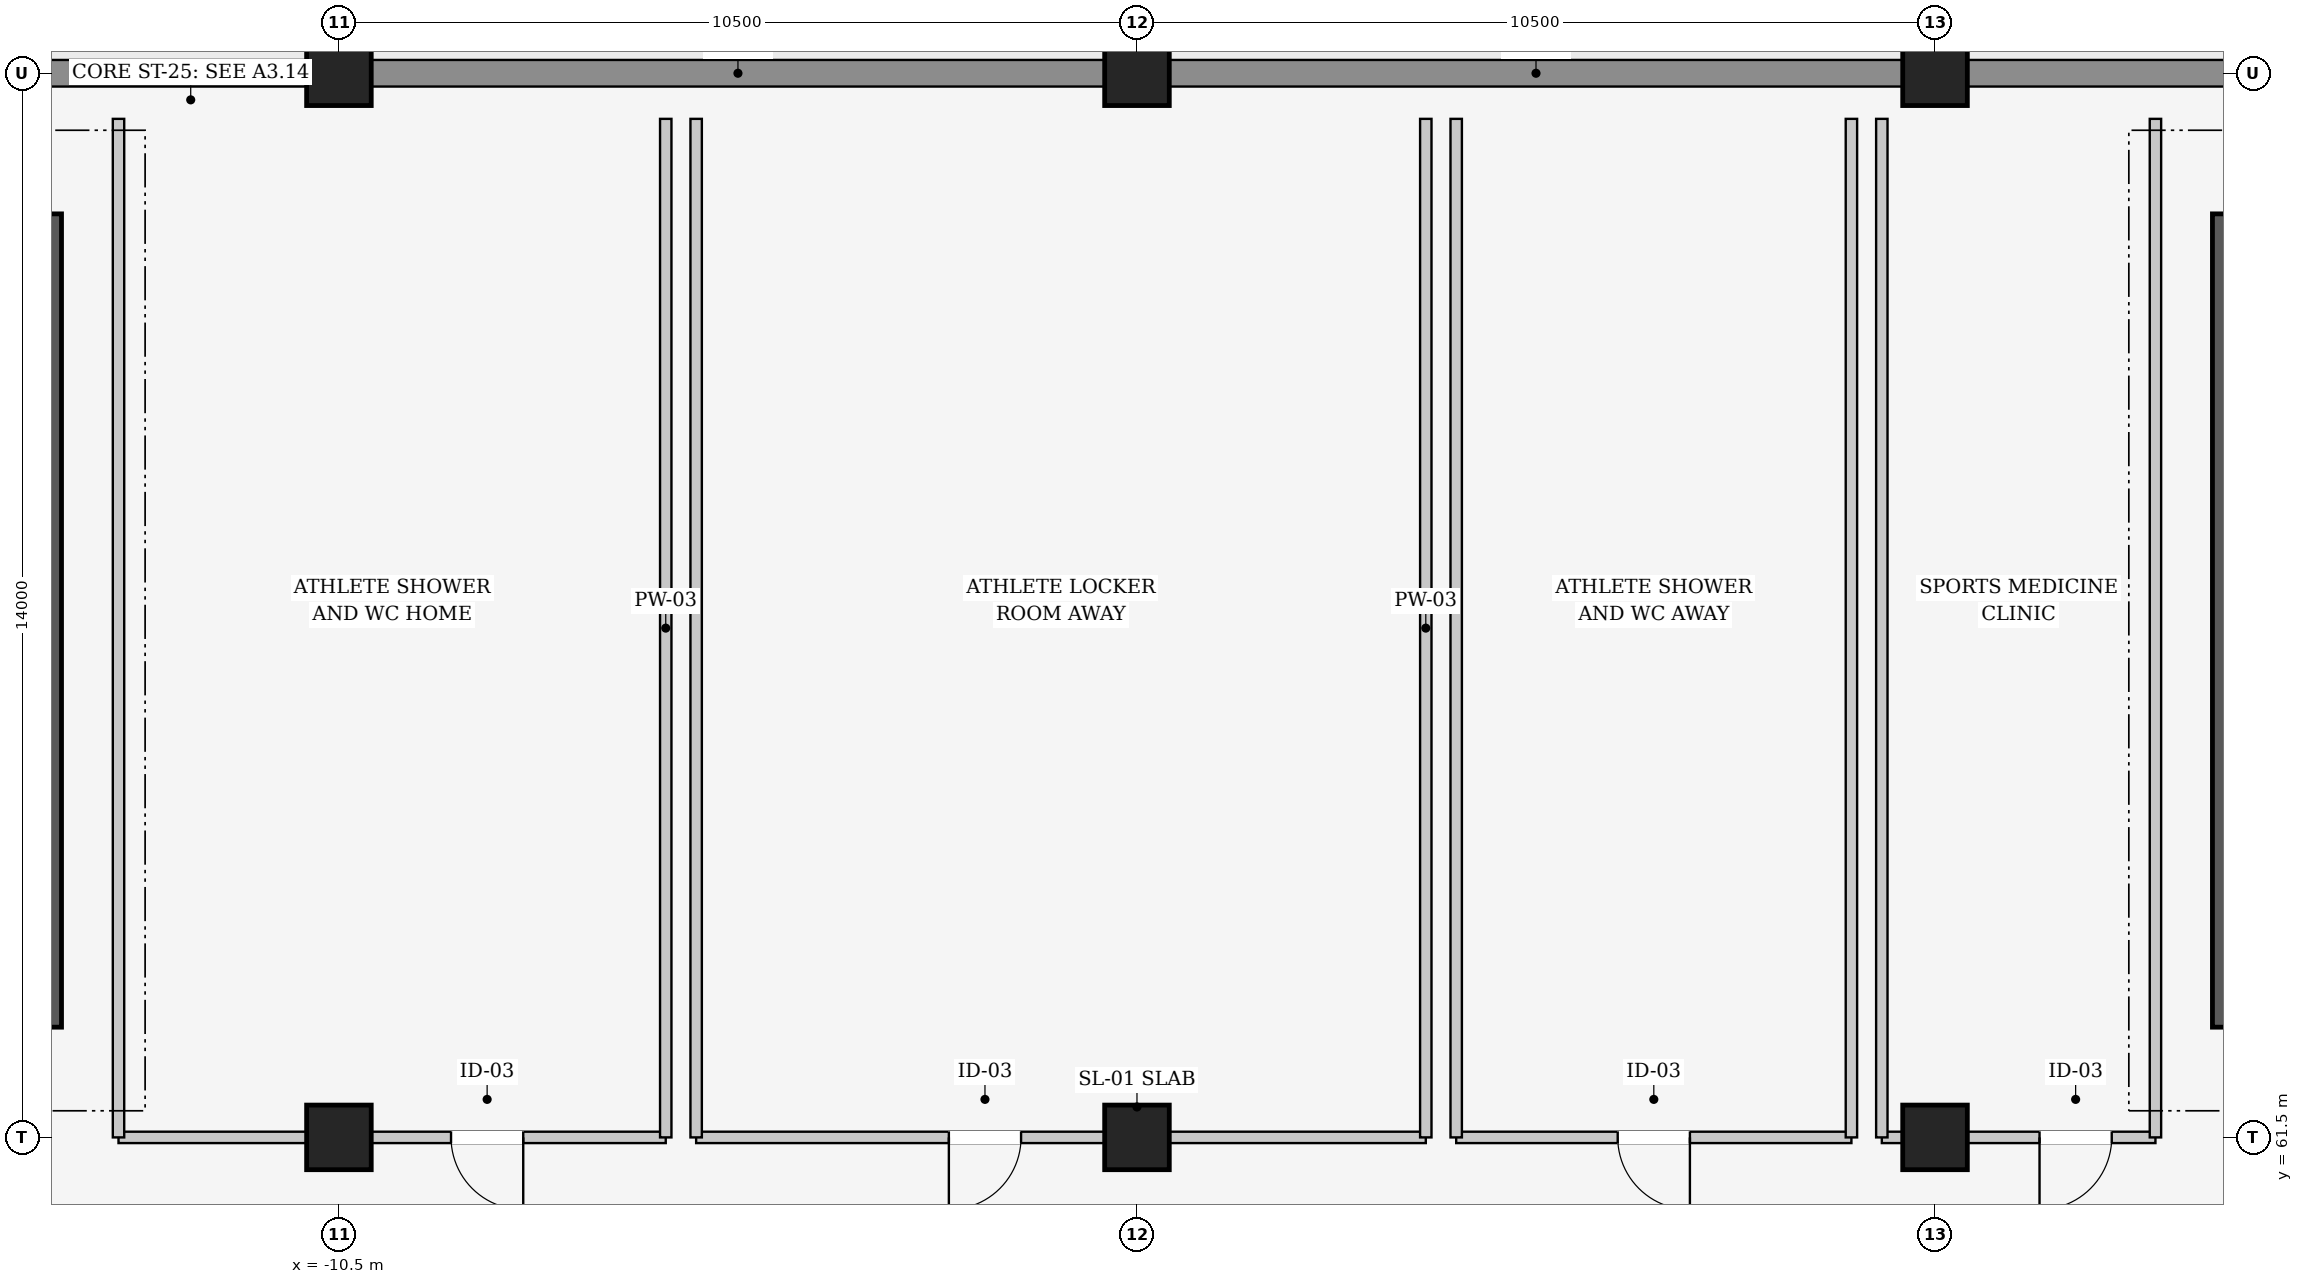
"""IFC4 building model, lengths in metres.
Left out: names, types, materials, properties, quantities, classifications, styles, units other than length and angle.
Written with IfcOpenShell. Run it as: python <this file> out.ifc"""

import sys

from ifc_helpers import new_model, si_unit, direction, frame, frame_2d, origin, origin_2d, place, context, subcontext, project, spatial, rectangle, extrude, element, fill, save


model = new_model("IFC4")
c1 = context("Model", 3, precision=1e-05, world=origin(), true_north=direction((0.0, 1.0)))
c2 = subcontext(c1, "Body", "Model", "MODEL_VIEW")
j1 = project(units=[si_unit("LENGTHUNIT", "METRE"), si_unit("PLANEANGLEUNIT", "RADIAN")], contexts=[c1])
p1 = place(None, origin())
s1 = spatial("IfcSite", under=j1, at=p1, CompositionType="ELEMENT")
p2 = place(p1, origin())
s2 = spatial("IfcBuilding", under=s1, at=p2, CompositionType="ELEMENT")
p3 = place(p2, origin())
s3 = spatial("IfcBuildingStorey", under=s2, at=p3, CompositionType="ELEMENT", Elevation=0.0)
for number, where, z_axis, x_axis in (
    (1, (-10.5, 61.5, 0.0), (0.0, 0.0, 1.0), (1.0, 0.0, 0.0)),
    (2, (-10.5, 75.5, 0.0), (0.0, 0.0, 1.0), (1.0, 0.0, 0.0)),
    (3, (0.0, 61.5, 0.0), (0.0, 0.0, 1.0), (1.0, 0.0, 0.0)),
    (4, (0.0, 75.5, 0.0), (0.0, 0.0, 1.0), (1.0, 0.0, 0.0)),
    (5, (10.5, 61.5, 0.0), (0.0, 0.0, 1.0), (1.0, 0.0, 0.0)),
    (6, (10.5, 75.5, 0.0), (0.0, 0.0, 1.0), (1.0, 0.0, 0.0)),
):
    element("IfcColumn", number, at=place(p3, frame(where, z_axis=z_axis, x_axis=x_axis)), inside=s3, PredefinedType="COLUMN", context=c2, shape_type="SweptSolid", body=[
        extrude(rectangle(XDim=0.85, YDim=0.85, at=origin_2d()), origin(), (0.0, 0.0, 1.0), 6.0),
    ])
p4 = place(p3, frame((-20.593, 75.5, 0.0), z_axis=(0.0, 0.0, 1.0), x_axis=(1.0, 0.0, 0.0)))
e7 = element("IfcWall", 7, at=p4, inside=s3, PredefinedType="SOLIDWALL", context=c2, shape_type="SweptSolid", body=[
    extrude(rectangle(XDim=9.686, YDim=0.35, at=frame_2d((4.843, 0.0))), origin(), (0.0, 0.0, 1.0), 4.84),
])
p5 = place(p4, frame((3.643, 0.0, 0.0)))
e8 = element("IfcOpeningElement", 8, at=p5, cuts=e7, PredefinedType="OPENING", context=c2, shape_type="SweptSolid", body=[
    extrude(rectangle(XDim=2.4, YDim=2.6, at=frame_2d((1.2, 1.3))), frame((0.0, 0.185, 0.0), z_axis=(0.0, -1.0, 0.0), x_axis=(1.0, 0.0, 0.0)), (0.0, 0.0, 1.0), 0.37),
])
for number, where, z_axis, x_axis in (
    (9, (-10.093, 75.5, 0.0), (0.0, 0.0, 1.0), (1.0, 0.0, 0.0)),
    (10, (0.407, 75.5, 0.0), (0.0, 0.0, 1.0), (1.0, 0.0, 0.0)),
    (11, (10.907, 75.5, 0.0), (0.0, 0.0, 1.0), (1.0, 0.0, 0.0)),
):
    element("IfcWall", number, at=place(p3, frame(where, z_axis=z_axis, x_axis=x_axis)), inside=s3, PredefinedType="SOLIDWALL", context=c2, shape_type="SweptSolid", body=[
        extrude(rectangle(XDim=9.686, YDim=0.35, at=frame_2d((4.843, 0.0))), origin(), (0.0, 0.0, 1.0), 4.84),
    ])
for number, where, z_axis, x_axis in (
    (12, (-14.275, 73.65, 0.0), (0.0, 0.0, 1.0), (0.0, -1.0, 0.0)),
    (13, (14.275, 62.95, 0.0), (0.0, 0.0, 1.0), (0.0, 1.0, 0.0)),
):
    element("IfcWall", number, at=place(p3, frame(where, z_axis=z_axis, x_axis=x_axis)), inside=s3, PredefinedType="SHEAR", context=c2, shape_type="SweptSolid", body=[
        extrude(rectangle(XDim=10.7, YDim=0.25, at=frame_2d((5.35, 0.0))), origin(), (0.0, 0.0, 1.0), 6.0),
    ])
p6 = place(p3, frame((-6.2, 61.5, 0.0), z_axis=(0.0, 0.0, 1.0), x_axis=(-1.0, 0.0, 0.0)))
e14 = element("IfcWall", 14, at=p6, inside=s3, PredefinedType="PARTITIONING", context=c2, shape_type="SweptSolid", body=[
    extrude(rectangle(XDim=7.2, YDim=0.15, at=frame_2d((3.6, 0.0))), origin(), (0.0, 0.0, 1.0), 4.825),
])
p7 = place(p6, frame((1.875, 0.0, 0.0)))
e15 = element("IfcOpeningElement", 15, at=p7, cuts=e14, PredefinedType="OPENING", context=c2, shape_type="SweptSolid", body=[
    extrude(rectangle(XDim=0.95, YDim=2.15, at=frame_2d((0.475, 1.075))), frame((0.0, 0.085, 0.0), z_axis=(0.0, -1.0, 0.0), x_axis=(1.0, 0.0, 0.0)), (0.0, 0.0, 1.0), 0.17),
])
for number, where, z_axis, x_axis in (
    (16, (-6.2, 74.9, 0.0), (0.0, 0.0, 1.0), (0.0, -1.0, 0.0)),
    (17, (-13.4, 61.5, 0.0), (0.0, 0.0, 1.0), (0.0, 1.0, 0.0)),
):
    element("IfcWall", number, at=place(p3, frame(where, z_axis=z_axis, x_axis=x_axis)), inside=s3, PredefinedType="PARTITIONING", context=c2, shape_type="SweptSolid", body=[
        extrude(rectangle(XDim=13.4, YDim=0.15, at=frame_2d((6.7, 0.0))), origin(), (0.0, 0.0, 1.0), 4.825),
    ])
p8 = place(p3, frame((3.8, 61.5, 0.0), z_axis=(0.0, 0.0, 1.0), x_axis=(-1.0, 0.0, 0.0)))
e18 = element("IfcWall", 18, at=p8, inside=s3, PredefinedType="PARTITIONING", context=c2, shape_type="SweptSolid", body=[
    extrude(rectangle(XDim=9.6, YDim=0.15, at=frame_2d((4.8, 0.0))), origin(), (0.0, 0.0, 1.0), 4.825),
])
p9 = place(p8, frame((5.325, 0.0, 0.0)))
e19 = element("IfcOpeningElement", 19, at=p9, cuts=e18, PredefinedType="OPENING", context=c2, shape_type="SweptSolid", body=[
    extrude(rectangle(XDim=0.95, YDim=2.15, at=frame_2d((0.475, 1.075))), frame((0.0, 0.085, 0.0), z_axis=(0.0, -1.0, 0.0), x_axis=(1.0, 0.0, 0.0)), (0.0, 0.0, 1.0), 0.17),
])
for number, where, z_axis, x_axis in (
    (20, (3.8, 74.9, 0.0), (0.0, 0.0, 1.0), (0.0, -1.0, 0.0)),
    (21, (-5.8, 61.5, 0.0), (0.0, 0.0, 1.0), (0.0, 1.0, 0.0)),
):
    element("IfcWall", number, at=place(p3, frame(where, z_axis=z_axis, x_axis=x_axis)), inside=s3, PredefinedType="PARTITIONING", context=c2, shape_type="SweptSolid", body=[
        extrude(rectangle(XDim=13.4, YDim=0.15, at=frame_2d((6.7, 0.0))), origin(), (0.0, 0.0, 1.0), 4.825),
    ])
p10 = place(p3, frame((9.4, 61.5, 0.0), z_axis=(0.0, 0.0, 1.0), x_axis=(-1.0, 0.0, 0.0)))
e22 = element("IfcWall", 22, at=p10, inside=s3, PredefinedType="PARTITIONING", context=c2, shape_type="SweptSolid", body=[
    extrude(rectangle(XDim=5.2, YDim=0.15, at=frame_2d((2.6, 0.0))), origin(), (0.0, 0.0, 1.0), 4.825),
])
p11 = place(p10, frame((2.125, 0.0, 0.0)))
e23 = element("IfcOpeningElement", 23, at=p11, cuts=e22, PredefinedType="OPENING", context=c2, shape_type="SweptSolid", body=[
    extrude(rectangle(XDim=0.95, YDim=2.15, at=frame_2d((0.475, 1.075))), frame((0.0, 0.085, 0.0), z_axis=(0.0, -1.0, 0.0), x_axis=(1.0, 0.0, 0.0)), (0.0, 0.0, 1.0), 0.17),
])
for number, where, z_axis, x_axis in (
    (24, (9.4, 74.9, 0.0), (0.0, 0.0, 1.0), (0.0, -1.0, 0.0)),
    (25, (4.2, 61.5, 0.0), (0.0, 0.0, 1.0), (0.0, 1.0, 0.0)),
):
    element("IfcWall", number, at=place(p3, frame(where, z_axis=z_axis, x_axis=x_axis)), inside=s3, PredefinedType="PARTITIONING", context=c2, shape_type="SweptSolid", body=[
        extrude(rectangle(XDim=13.4, YDim=0.15, at=frame_2d((6.7, 0.0))), origin(), (0.0, 0.0, 1.0), 4.825),
    ])
p12 = place(p3, frame((13.4, 61.5, 0.0), z_axis=(0.0, 0.0, 1.0), x_axis=(-1.0, 0.0, 0.0)))
e26 = element("IfcWall", 26, at=p12, inside=s3, PredefinedType="PARTITIONING", context=c2, shape_type="SweptSolid", body=[
    extrude(rectangle(XDim=3.6, YDim=0.15, at=frame_2d((1.8, 0.0))), origin(), (0.0, 0.0, 1.0), 4.825),
])
p13 = place(p12, frame((0.575, 0.0, 0.0)))
e27 = element("IfcOpeningElement", 27, at=p13, cuts=e26, PredefinedType="OPENING", context=c2, shape_type="SweptSolid", body=[
    extrude(rectangle(XDim=0.95, YDim=2.15, at=frame_2d((0.475, 1.075))), frame((0.0, 0.085, 0.0), z_axis=(0.0, -1.0, 0.0), x_axis=(1.0, 0.0, 0.0)), (0.0, 0.0, 1.0), 0.17),
])
for number, where, z_axis, x_axis in (
    (28, (13.4, 74.9, 0.0), (0.0, 0.0, 1.0), (0.0, -1.0, 0.0)),
    (29, (9.8, 61.5, 0.0), (0.0, 0.0, 1.0), (0.0, 1.0, 0.0)),
):
    element("IfcWall", number, at=place(p3, frame(where, z_axis=z_axis, x_axis=x_axis)), inside=s3, PredefinedType="PARTITIONING", context=c2, shape_type="SweptSolid", body=[
        extrude(rectangle(XDim=13.4, YDim=0.15, at=frame_2d((6.7, 0.0))), origin(), (0.0, 0.0, 1.0), 4.825),
    ])
p14 = place(p7, origin())
e30 = element("IfcDoor", 30, at=p14, inside=s3, OperationType="SINGLE_SWING_LEFT", PredefinedType="DOOR", context=c2, shape_type="SweptSolid", body=[
    extrude(rectangle(XDim=0.95, YDim=2.15, at=frame_2d((0.475, 1.075))), frame((0.0, 0.025, 0.0), z_axis=(0.0, -1.0, 0.0), x_axis=(1.0, 0.0, 0.0)), (0.0, 0.0, 1.0), 0.05),
])
fill(e15, e30)
p15 = place(p9, origin())
e31 = element("IfcDoor", 31, at=p15, inside=s3, OperationType="SINGLE_SWING_RIGHT", PredefinedType="DOOR", context=c2, shape_type="SweptSolid", body=[
    extrude(rectangle(XDim=0.95, YDim=2.15, at=frame_2d((0.475, 1.075))), frame((0.0, 0.025, 0.0), z_axis=(0.0, -1.0, 0.0), x_axis=(1.0, 0.0, 0.0)), (0.0, 0.0, 1.0), 0.05),
])
fill(e19, e31)
p16 = place(p11, origin())
e32 = element("IfcDoor", 32, at=p16, inside=s3, OperationType="SINGLE_SWING_LEFT", PredefinedType="DOOR", context=c2, shape_type="SweptSolid", body=[
    extrude(rectangle(XDim=0.95, YDim=2.15, at=frame_2d((0.475, 1.075))), frame((0.0, 0.025, 0.0), z_axis=(0.0, -1.0, 0.0), x_axis=(1.0, 0.0, 0.0)), (0.0, 0.0, 1.0), 0.05),
])
fill(e23, e32)
p17 = place(p13, origin())
e33 = element("IfcDoor", 33, at=p17, inside=s3, OperationType="SINGLE_SWING_RIGHT", PredefinedType="DOOR", context=c2, shape_type="SweptSolid", body=[
    extrude(rectangle(XDim=0.95, YDim=2.15, at=frame_2d((0.475, 1.075))), frame((0.0, 0.025, 0.0), z_axis=(0.0, -1.0, 0.0), x_axis=(1.0, 0.0, 0.0)), (0.0, 0.0, 1.0), 0.05),
])
fill(e27, e33)
save(model, sys.argv[1])
